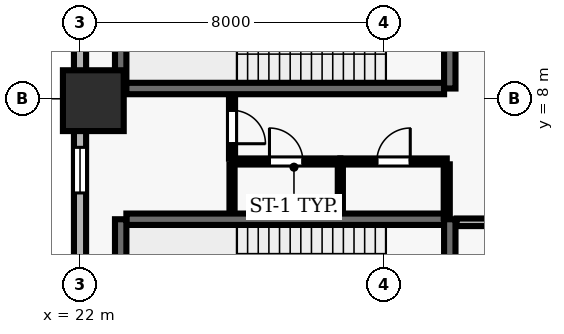
"""IFC4 building model, lengths in metres.
Left out: names, types, materials, properties, quantities, classifications, styles, units other than length and angle.
Written with IfcOpenShell. Run it as: python <this file> out.ifc"""

import sys

from ifc_helpers import new_model, si_unit, direction, frame, frame_2d, origin, origin_2d, place, context, subcontext, project, spatial, rectangle, extrude, element, fill, save


model = new_model("IFC4")
c1 = context("Model", 3, precision=1e-05, world=origin(), true_north=direction((0.0, 1.0)))
c2 = subcontext(c1, "Body", "Model", "MODEL_VIEW")
j1 = project(units=[si_unit("LENGTHUNIT", "METRE"), si_unit("PLANEANGLEUNIT", "RADIAN")], contexts=[c1])
p1 = place(None, origin())
s1 = spatial("IfcSite", under=j1, at=p1, CompositionType="ELEMENT")
p2 = place(p1, origin())
s2 = spatial("IfcBuilding", under=s1, at=p2, CompositionType="ELEMENT")
p3 = place(p2, frame((0.0, 0.0, 15.6)))
s3 = spatial("IfcBuildingStorey", under=s2, at=p3, CompositionType="ELEMENT", Elevation=15.6)
p4 = place(p3, frame((22.35, 7.95, 0.0), z_axis=(0.0, 0.0, 1.0), x_axis=(1.0, 0.0, 0.0)))
e1 = element("IfcColumn", 1, at=p4, inside=s3, PredefinedType="COLUMN", context=c2, shape_type="SweptSolid", body=[
    extrude(rectangle(XDim=1.6, YDim=1.6, at=origin_2d()), origin(), (0.0, 0.0, 1.0), 5.2),
])
p5 = place(p3, frame((22.0, 51.5, 0.0), z_axis=(0.0, 0.0, 1.0), x_axis=(0.0, -1.0, 0.0)))
e2 = element("IfcWall", 2, at=p5, inside=s3, PredefinedType="SOLIDWALL", context=c2, shape_type="SweptSolid", body=[
    extrude(rectangle(XDim=49.0, YDim=0.32, at=frame_2d((24.5, 0.0))), origin(), (0.0, 0.0, 1.0), 4.92),
])
p6 = place(p5, frame((2.122, 0.0, 0.9)))
e3 = element("IfcOpeningElement", 3, at=p6, cuts=e2, PredefinedType="OPENING", context=c2, shape_type="SweptSolid", body=[
    extrude(rectangle(XDim=1.2, YDim=1.6, at=frame_2d((0.6, 0.8))), frame((0.0, 0.17, 0.0), z_axis=(0.0, -1.0, 0.0), x_axis=(1.0, 0.0, 0.0)), (0.0, 0.0, 1.0), 0.34),
])
p7 = place(p5, frame((7.567, 0.0, 0.9)))
e4 = element("IfcOpeningElement", 4, at=p7, cuts=e2, PredefinedType="OPENING", context=c2, shape_type="SweptSolid", body=[
    extrude(rectangle(XDim=1.2, YDim=1.6, at=frame_2d((0.6, 0.8))), frame((0.0, 0.17, 0.0), z_axis=(0.0, -1.0, 0.0), x_axis=(1.0, 0.0, 0.0)), (0.0, 0.0, 1.0), 0.34),
])
p8 = place(p5, frame((13.011, 0.0, 0.9)))
e5 = element("IfcOpeningElement", 5, at=p8, cuts=e2, PredefinedType="OPENING", context=c2, shape_type="SweptSolid", body=[
    extrude(rectangle(XDim=1.2, YDim=1.6, at=frame_2d((0.6, 0.8))), frame((0.0, 0.17, 0.0), z_axis=(0.0, -1.0, 0.0), x_axis=(1.0, 0.0, 0.0)), (0.0, 0.0, 1.0), 0.34),
])
p9 = place(p5, frame((19.356, 0.0, 0.9)))
e6 = element("IfcOpeningElement", 6, at=p9, cuts=e2, PredefinedType="OPENING", context=c2, shape_type="SweptSolid", body=[
    extrude(rectangle(XDim=1.2, YDim=1.6, at=frame_2d((0.6, 0.8))), frame((0.0, 0.17, 0.0), z_axis=(0.0, -1.0, 0.0), x_axis=(1.0, 0.0, 0.0)), (0.0, 0.0, 1.0), 0.34),
])
p10 = place(p5, frame((23.45, 0.0, 0.9)))
e7 = element("IfcOpeningElement", 7, at=p10, cuts=e2, PredefinedType="OPENING", context=c2, shape_type="SweptSolid", body=[
    extrude(rectangle(XDim=1.2, YDim=1.6, at=frame_2d((0.6, 0.8))), frame((0.0, 0.17, 0.0), z_axis=(0.0, -1.0, 0.0), x_axis=(1.0, 0.0, 0.0)), (0.0, 0.0, 1.0), 0.34),
])
p11 = place(p5, frame((29.344, 0.0, 0.9)))
e8 = element("IfcOpeningElement", 8, at=p11, cuts=e2, PredefinedType="OPENING", context=c2, shape_type="SweptSolid", body=[
    extrude(rectangle(XDim=1.2, YDim=1.6, at=frame_2d((0.6, 0.8))), frame((0.0, 0.17, 0.0), z_axis=(0.0, -1.0, 0.0), x_axis=(1.0, 0.0, 0.0)), (0.0, 0.0, 1.0), 0.34),
])
p12 = place(p5, frame((34.339, 0.0, 0.9)))
e9 = element("IfcOpeningElement", 9, at=p12, cuts=e2, PredefinedType="OPENING", context=c2, shape_type="SweptSolid", body=[
    extrude(rectangle(XDim=1.2, YDim=1.6, at=frame_2d((0.6, 0.8))), frame((0.0, 0.17, 0.0), z_axis=(0.0, -1.0, 0.0), x_axis=(1.0, 0.0, 0.0)), (0.0, 0.0, 1.0), 0.34),
])
p13 = place(p5, frame((40.233, 0.0, 0.9)))
e10 = element("IfcOpeningElement", 10, at=p13, cuts=e2, PredefinedType="OPENING", context=c2, shape_type="SweptSolid", body=[
    extrude(rectangle(XDim=1.2, YDim=1.6, at=frame_2d((0.6, 0.8))), frame((0.0, 0.17, 0.0), z_axis=(0.0, -1.0, 0.0), x_axis=(1.0, 0.0, 0.0)), (0.0, 0.0, 1.0), 0.34),
])
p14 = place(p5, frame((44.778, 0.0, 0.9)))
e11 = element("IfcOpeningElement", 11, at=p14, cuts=e2, PredefinedType="OPENING", context=c2, shape_type="SweptSolid", body=[
    extrude(rectangle(XDim=1.2, YDim=1.6, at=frame_2d((0.6, 0.8))), frame((0.0, 0.17, 0.0), z_axis=(0.0, -1.0, 0.0), x_axis=(1.0, 0.0, 0.0)), (0.0, 0.0, 1.0), 0.34),
])
p15 = place(p3, frame((31.58, 4.83, 0.0), z_axis=(0.0, 0.0, 1.0), x_axis=(-1.0, 0.0, 0.0)))
e12 = element("IfcWall", 12, at=p15, inside=s3, PredefinedType="SHEAR", context=c2, shape_type="SweptSolid", body=[
    extrude(rectangle(XDim=8.36, YDim=0.3, at=frame_2d((4.18, 0.0))), origin(), (0.0, 0.0, 1.0), 4.92),
])
p16 = place(p3, frame((23.07, 4.83, 0.0), z_axis=(0.0, 0.0, 1.0), x_axis=(0.0, -1.0, 0.0)))
e13 = element("IfcWall", 13, at=p16, inside=s3, PredefinedType="SHEAR", context=c2, shape_type="SweptSolid", body=[
    extrude(rectangle(XDim=3.51, YDim=0.3, at=frame_2d((1.755, 0.0))), origin(), (0.0, 0.0, 1.0), 4.92),
])
p17 = place(p3, frame((31.73, 0.96, 0.0), z_axis=(0.0, 0.0, 1.0), x_axis=(0.0, 1.0, 0.0)))
e14 = element("IfcWall", 14, at=p17, inside=s3, PredefinedType="SHEAR", context=c2, shape_type="SweptSolid", body=[
    extrude(rectangle(XDim=3.87, YDim=0.3, at=frame_2d((1.935, 0.0))), origin(), (0.0, 0.0, 1.0), 4.92),
])
p18 = place(p17, frame((1.54, 0.0, 0.0)))
e15 = element("IfcOpeningElement", 15, at=p18, cuts=e14, PredefinedType="OPENING", context=c2, shape_type="SweptSolid", body=[
    extrude(rectangle(XDim=1.15, YDim=2.15, at=frame_2d((0.575, 1.075))), frame((0.0, 0.16, 0.0), z_axis=(0.0, -1.0, 0.0), x_axis=(1.0, 0.0, 0.0)), (0.0, 0.0, 1.0), 0.32),
])
p19 = place(p3, frame((23.07, 11.78, 0.0), z_axis=(0.0, 0.0, 1.0), x_axis=(0.0, -1.0, 0.0)))
e16 = element("IfcWall", 16, at=p19, inside=s3, PredefinedType="SHEAR", context=c2, shape_type="SweptSolid", body=[
    extrude(rectangle(XDim=3.51, YDim=0.3, at=frame_2d((1.755, 0.0))), origin(), (0.0, 0.0, 1.0), 4.92),
])
p20 = place(p3, frame((23.22, 8.27, 0.0), z_axis=(0.0, 0.0, 1.0), x_axis=(1.0, 0.0, 0.0)))
e17 = element("IfcWall", 17, at=p20, inside=s3, PredefinedType="SHEAR", context=c2, shape_type="SweptSolid", body=[
    extrude(rectangle(XDim=8.36, YDim=0.3, at=frame_2d((4.18, 0.0))), origin(), (0.0, 0.0, 1.0), 4.92),
])
p21 = place(p3, frame((31.73, 8.27, 0.0), z_axis=(0.0, 0.0, 1.0), x_axis=(0.0, 1.0, 0.0)))
e18 = element("IfcWall", 18, at=p21, inside=s3, PredefinedType="SHEAR", context=c2, shape_type="SweptSolid", body=[
    extrude(rectangle(XDim=3.51, YDim=0.3, at=frame_2d((1.755, 0.0))), origin(), (0.0, 0.0, 1.0), 4.92),
])
p22 = place(p21, frame((1.18, 0.0, 0.0)))
e19 = element("IfcOpeningElement", 19, at=p22, cuts=e18, PredefinedType="OPENING", context=c2, shape_type="SweptSolid", body=[
    extrude(rectangle(XDim=1.15, YDim=2.15, at=frame_2d((0.575, 1.075))), frame((0.0, 0.16, 0.0), z_axis=(0.0, -1.0, 0.0), x_axis=(1.0, 0.0, 0.0)), (0.0, 0.0, 1.0), 0.32),
])
p23 = place(p3, frame((26.0, 6.35, 0.0), z_axis=(0.0, 0.0, 1.0), x_axis=(1.0, 0.0, 0.0)))
e20 = element("IfcWall", 20, at=p23, inside=s3, PredefinedType="PARTITIONING", context=c2, shape_type="SweptSolid", body=[
    extrude(rectangle(XDim=2.85, YDim=0.16, at=frame_2d((1.425, 0.0))), origin(), (0.0, 0.0, 1.0), 4.92),
])
p24 = place(p23, frame((0.985, 0.0, 0.0)))
e21 = element("IfcOpeningElement", 21, at=p24, cuts=e20, PredefinedType="OPENING", context=c2, shape_type="SweptSolid", body=[
    extrude(rectangle(XDim=0.88, YDim=2.1, at=frame_2d((0.44, 1.05))), frame((0.0, 0.09, 0.0), z_axis=(0.0, -1.0, 0.0), x_axis=(1.0, 0.0, 0.0)), (0.0, 0.0, 1.0), 0.18),
])
p25 = place(p3, frame((28.85, 6.35, 0.0), z_axis=(0.0, 0.0, 1.0), x_axis=(1.0, 0.0, 0.0)))
e22 = element("IfcWall", 22, at=p25, inside=s3, PredefinedType="PARTITIONING", context=c2, shape_type="SweptSolid", body=[
    extrude(rectangle(XDim=2.8, YDim=0.16, at=frame_2d((1.4, 0.0))), origin(), (0.0, 0.0, 1.0), 4.92),
])
p26 = place(p25, frame((0.96, 0.0, 0.0)))
e23 = element("IfcOpeningElement", 23, at=p26, cuts=e22, PredefinedType="OPENING", context=c2, shape_type="SweptSolid", body=[
    extrude(rectangle(XDim=0.88, YDim=2.1, at=frame_2d((0.44, 1.05))), frame((0.0, 0.09, 0.0), z_axis=(0.0, -1.0, 0.0), x_axis=(1.0, 0.0, 0.0)), (0.0, 0.0, 1.0), 0.18),
])
p27 = place(p3, frame((35.02, 4.75, 0.0), z_axis=(0.0, 0.0, 1.0), x_axis=(-1.0, 0.0, 0.0)))
e24 = element("IfcWall", 24, at=p27, inside=s3, PredefinedType="SOLIDWALL", context=c2, shape_type="SweptSolid", body=[
    extrude(rectangle(XDim=3.11, YDim=0.2, at=frame_2d((1.555, 0.0))), origin(), (0.0, 0.0, 1.0), 4.92),
])
p28 = place(p27, frame((1.03, 0.0, 0.0)))
e25 = element("IfcOpeningElement", 25, at=p28, cuts=e24, PredefinedType="OPENING", context=c2, shape_type="SweptSolid", body=[
    extrude(rectangle(XDim=1.05, YDim=2.15, at=frame_2d((0.525, 1.075))), frame((0.0, 0.11, 0.0), z_axis=(0.0, -1.0, 0.0), x_axis=(1.0, 0.0, 0.0)), (0.0, 0.0, 1.0), 0.22),
])
p29 = place(p3, frame((26.0, 5.01, 0.0), z_axis=(0.0, 0.0, 1.0), x_axis=(0.0, 1.0, 0.0)))
e26 = element("IfcWall", 26, at=p29, inside=s3, PredefinedType="PARTITIONING", context=c2, shape_type="SweptSolid", body=[
    extrude(rectangle(XDim=1.265, YDim=0.135, at=frame_2d((0.632, 0.0))), origin(), (0.0, 0.0, 1.0), 4.92),
])
p30 = place(p3, frame((26.0, 8.09, 0.0), z_axis=(0.0, 0.0, 1.0), x_axis=(0.0, -1.0, 0.0)))
e27 = element("IfcWall", 27, at=p30, inside=s3, PredefinedType="PARTITIONING", context=c2, shape_type="SweptSolid", body=[
    extrude(rectangle(XDim=1.665, YDim=0.16, at=frame_2d((0.833, 0.0))), origin(), (0.0, 0.0, 1.0), 4.92),
])
p31 = place(p30, frame((0.393, 0.0, 0.0)))
e28 = element("IfcOpeningElement", 28, at=p31, cuts=e27, PredefinedType="OPENING", context=c2, shape_type="SweptSolid", body=[
    extrude(rectangle(XDim=0.88, YDim=2.1, at=frame_2d((0.44, 1.05))), frame((0.0, 0.09, 0.0), z_axis=(0.0, -1.0, 0.0), x_axis=(1.0, 0.0, 0.0)), (0.0, 0.0, 1.0), 0.18),
])
p32 = place(p3, frame((28.85, 5.01, 0.0), z_axis=(0.0, 0.0, 1.0), x_axis=(0.0, 1.0, 0.0)))
e29 = element("IfcWall", 29, at=p32, inside=s3, PredefinedType="PARTITIONING", context=c2, shape_type="SweptSolid", body=[
    extrude(rectangle(XDim=1.265, YDim=0.135, at=frame_2d((0.632, 0.0))), origin(), (0.0, 0.0, 1.0), 4.92),
])
p33 = place(p3, frame((31.65, 4.86, 0.0), z_axis=(0.0, 0.0, 1.0), x_axis=(0.0, 1.0, 0.0)))
e30 = element("IfcWall", 30, at=p33, inside=s3, PredefinedType="PARTITIONING", context=c2, shape_type="SweptSolid", body=[
    extrude(rectangle(XDim=1.415, YDim=0.16, at=frame_2d((0.708, 0.0))), origin(), (0.0, 0.0, 1.0), 4.92),
])
p34 = place(p14, origin())
e31 = element("IfcWindow", 31, at=p34, inside=s3, PartitioningType="SINGLE_PANEL", PredefinedType="WINDOW", context=c2, shape_type="SweptSolid", body=[
    extrude(rectangle(XDim=1.2, YDim=1.6, at=frame_2d((0.6, 0.8))), frame((0.0, 0.03, 0.0), z_axis=(0.0, -1.0, 0.0), x_axis=(1.0, 0.0, 0.0)), (0.0, 0.0, 1.0), 0.06),
])
fill(e11, e31)
p35 = place(p31, origin())
e32 = element("IfcDoor", 32, at=p35, inside=s3, OperationType="SINGLE_SWING_RIGHT", PredefinedType="DOOR", context=c2, shape_type="SweptSolid", body=[
    extrude(rectangle(XDim=0.88, YDim=2.1, at=frame_2d((0.44, 1.05))), frame((0.0, 0.025, 0.0), z_axis=(0.0, -1.0, 0.0), x_axis=(1.0, 0.0, 0.0)), (0.0, 0.0, 1.0), 0.05),
])
fill(e28, e32)
p36 = place(p24, origin())
e33 = element("IfcDoor", 33, at=p36, inside=s3, OperationType="SINGLE_SWING_LEFT", PredefinedType="DOOR", context=c2, shape_type="SweptSolid", body=[
    extrude(rectangle(XDim=0.88, YDim=2.1, at=frame_2d((0.44, 1.05))), frame((0.0, 0.025, 0.0), z_axis=(0.0, -1.0, 0.0), x_axis=(1.0, 0.0, 0.0)), (0.0, 0.0, 1.0), 0.05),
])
fill(e21, e33)
p37 = place(p26, origin())
e34 = element("IfcDoor", 34, at=p37, inside=s3, OperationType="SINGLE_SWING_RIGHT", PredefinedType="DOOR", context=c2, shape_type="SweptSolid", body=[
    extrude(rectangle(XDim=0.88, YDim=2.1, at=frame_2d((0.44, 1.05))), frame((0.0, 0.025, 0.0), z_axis=(0.0, -1.0, 0.0), x_axis=(1.0, 0.0, 0.0)), (0.0, 0.0, 1.0), 0.05),
])
fill(e23, e34)
save(model, sys.argv[1])
